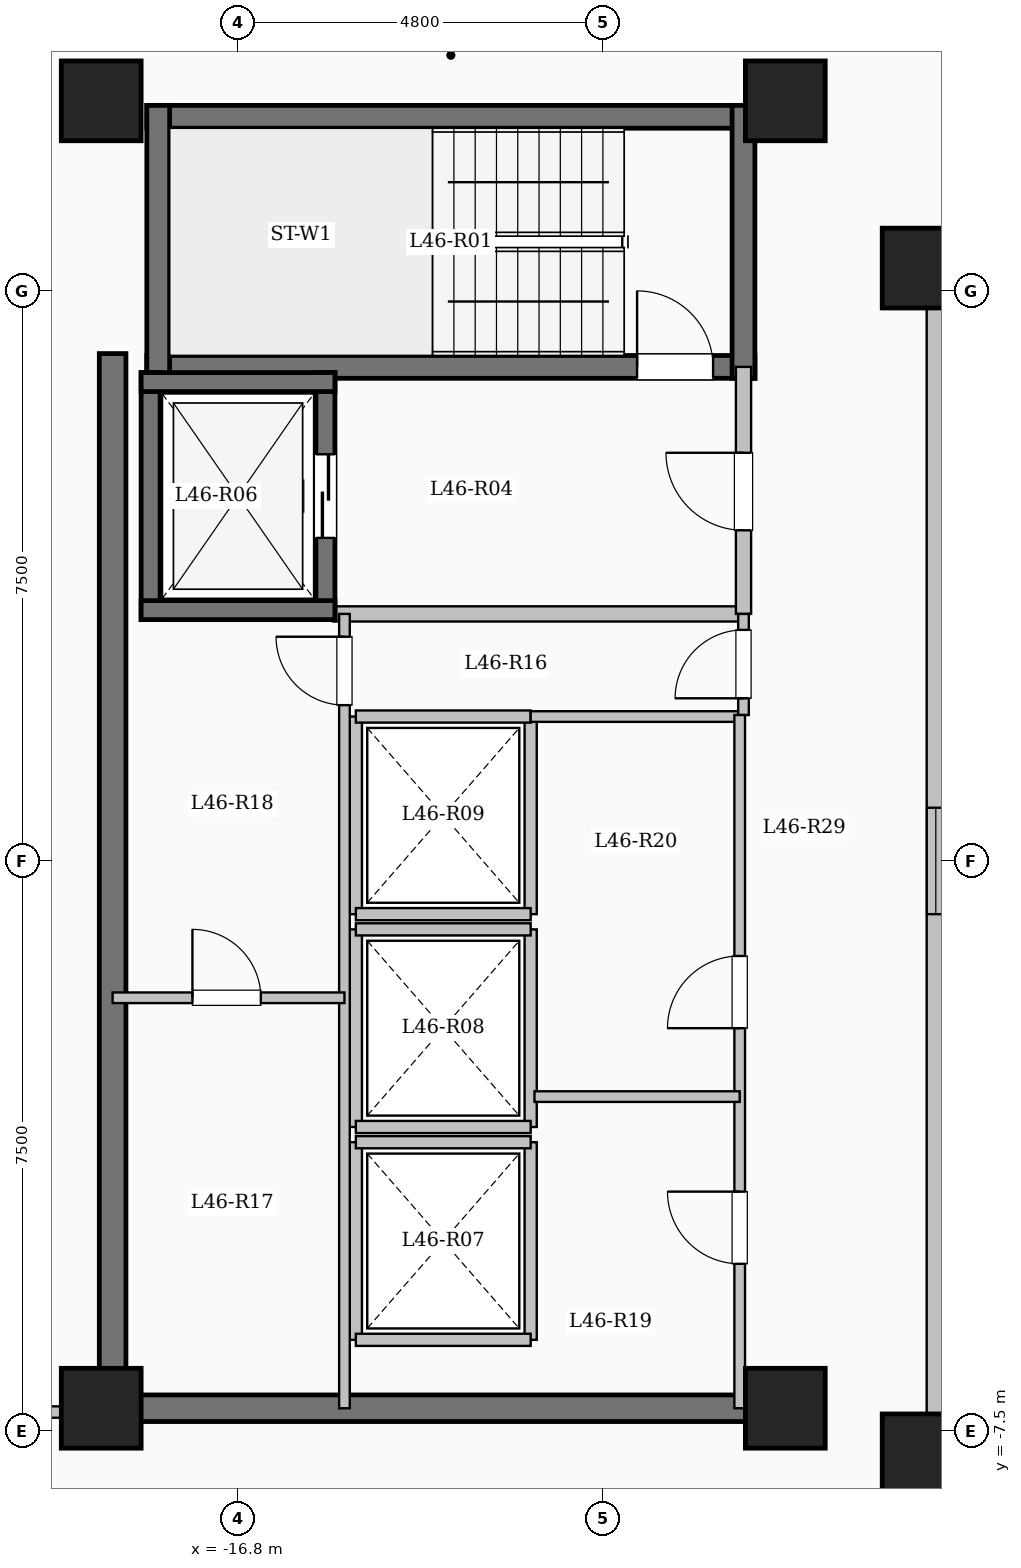
"""IFC4 building model, lengths in metres.
Left out: names, types, materials, properties, quantities, classifications, styles, units other than length and angle.
Written with IfcOpenShell. Run it as: python <this file> out.ifc"""

import sys

from ifc_helpers import new_model, si_unit, direction, frame, frame_2d, origin, origin_2d, place, context, subcontext, project, spatial, rectangle, extrude, element, fill, save


model = new_model("IFC4")
c1 = context("Model", 3, precision=1e-05, world=origin(), true_north=direction((0.0, 1.0)))
c2 = subcontext(c1, "Body", "Model", "MODEL_VIEW")
j1 = project(units=[si_unit("LENGTHUNIT", "METRE"), si_unit("PLANEANGLEUNIT", "RADIAN")], contexts=[c1])
p1 = place(None, origin())
s1 = spatial("IfcSite", under=j1, at=p1, CompositionType="ELEMENT")
p2 = place(p1, origin())
s2 = spatial("IfcBuilding", under=s1, at=p2, CompositionType="ELEMENT")
p3 = place(p2, frame((0.0, 0.0, 169.45)))
s3 = spatial("IfcBuildingStorey", under=s2, at=p3, CompositionType="ELEMENT", Elevation=169.45)
for number, where, z_axis, x_axis in (
    (1, (-7.8, -7.8, 0.0), (0.0, 0.0, 1.0), (1.0, 0.0, 0.0)),
    (2, (-7.8, 7.8, 0.0), (0.0, 0.0, 1.0), (1.0, 0.0, 0.0)),
    (3, (-9.6, -7.2, 0.0), (0.0, 0.0, 1.0), (1.0, 0.0, 0.0)),
    (4, (-9.6, 10.0, 0.0), (0.0, 0.0, 1.0), (1.0, 0.0, 0.0)),
    (5, (-18.6, -7.2, 0.0), (0.0, 0.0, 1.0), (1.0, 0.0, 0.0)),
    (6, (-18.6, 10.0, 0.0), (0.0, 0.0, 1.0), (1.0, 0.0, 0.0)),
):
    element("IfcColumn", number, at=place(p3, frame(where, z_axis=z_axis, x_axis=x_axis)), inside=s3, PredefinedType="COLUMN", context=c2, shape_type="SweptSolid", body=[
        extrude(rectangle(XDim=1.05, YDim=1.05, at=origin_2d()), origin(), (0.0, 0.0, 1.0), 3.35),
    ])
p4 = place(p3, frame((-7.62, -7.62, 0.0), z_axis=(0.0, 0.0, 1.0), x_axis=(1.0, 0.0, 0.0)))
e7 = element("IfcWall", 7, at=p4, inside=s3, PredefinedType="SOLIDWALL", context=c2, shape_type="SweptSolid", body=[
    extrude(rectangle(XDim=15.24, YDim=0.24, at=frame_2d((7.62, 0.0))), origin(), (0.0, 0.0, 1.0), 3.05),
])
p5 = place(p4, frame((6.92, 0.0, 0.95)))
e8 = element("IfcOpeningElement", 8, at=p5, cuts=e7, PredefinedType="OPENING", context=c2, shape_type="SweptSolid", body=[
    extrude(rectangle(XDim=1.4, YDim=1.5, at=frame_2d((0.7, 0.75))), frame((0.0, 0.13, 0.0), z_axis=(0.0, -1.0, 0.0), x_axis=(1.0, 0.0, 0.0)), (0.0, 0.0, 1.0), 0.26),
])
p6 = place(p3, frame((7.62, 7.62, 0.0), z_axis=(0.0, 0.0, 1.0), x_axis=(-1.0, 0.0, 0.0)))
e9 = element("IfcWall", 9, at=p6, inside=s3, PredefinedType="SOLIDWALL", context=c2, shape_type="SweptSolid", body=[
    extrude(rectangle(XDim=15.24, YDim=0.24, at=frame_2d((7.62, 0.0))), origin(), (0.0, 0.0, 1.0), 3.05),
])
p7 = place(p6, frame((6.92, 0.0, 0.95)))
e10 = element("IfcOpeningElement", 10, at=p7, cuts=e9, PredefinedType="OPENING", context=c2, shape_type="SweptSolid", body=[
    extrude(rectangle(XDim=1.4, YDim=1.5, at=frame_2d((0.7, 0.75))), frame((0.0, 0.13, 0.0), z_axis=(0.0, -1.0, 0.0), x_axis=(1.0, 0.0, 0.0)), (0.0, 0.0, 1.0), 0.26),
])
p8 = place(p3, frame((-7.62, 7.62, 0.0), z_axis=(0.0, 0.0, 1.0), x_axis=(0.0, -1.0, 0.0)))
e11 = element("IfcWall", 11, at=p8, inside=s3, PredefinedType="SOLIDWALL", context=c2, shape_type="SweptSolid", body=[
    extrude(rectangle(XDim=15.24, YDim=0.24, at=frame_2d((7.62, 0.0))), origin(), (0.0, 0.0, 1.0), 3.05),
])
p9 = place(p8, frame((6.92, 0.0, 0.95)))
e12 = element("IfcOpeningElement", 12, at=p9, cuts=e11, PredefinedType="OPENING", context=c2, shape_type="SweptSolid", body=[
    extrude(rectangle(XDim=1.4, YDim=1.5, at=frame_2d((0.7, 0.75))), frame((0.0, 0.13, 0.0), z_axis=(0.0, -1.0, 0.0), x_axis=(1.0, 0.0, 0.0)), (0.0, 0.0, 1.0), 0.26),
])
p10 = place(p3, frame((-18.0, 9.79, 0.0), z_axis=(0.0, 0.0, 1.0), x_axis=(1.0, 0.0, 0.0)))
e13 = element("IfcWall", 13, at=p10, inside=s3, PredefinedType="SHEAR", context=c2, shape_type="SweptSolid", body=[
    extrude(rectangle(XDim=8.0, YDim=0.3, at=frame_2d((4.0, 0.0))), origin(), (0.0, 0.0, 1.0), 3.35),
])
p11 = place(p3, frame((-18.0, 6.5, 0.0), z_axis=(0.0, 0.0, 1.0), x_axis=(1.0, 0.0, 0.0)))
e14 = element("IfcWall", 14, at=p11, inside=s3, PredefinedType="SHEAR", context=c2, shape_type="SweptSolid", body=[
    extrude(rectangle(XDim=8.0, YDim=0.3, at=frame_2d((4.0, 0.0))), origin(), (0.0, 0.0, 1.0), 3.35),
])
p12 = place(p11, frame((6.45, 0.0, 0.0)))
e15 = element("IfcOpeningElement", 15, at=p12, cuts=e14, PredefinedType="OPENING", context=c2, shape_type="SweptSolid", body=[
    extrude(rectangle(XDim=1.0, YDim=2.15, at=frame_2d((0.5, 1.075))), frame((0.0, 0.16, 0.0), z_axis=(0.0, -1.0, 0.0), x_axis=(1.0, 0.0, 0.0)), (0.0, 0.0, 1.0), 0.32),
])
for number, where, z_axis, x_axis in (
    (16, (-17.85, 6.35, 0.0), (0.0, 0.0, 1.0), (0.0, 1.0, 0.0)),
    (17, (-10.15, 6.35, 0.0), (0.0, 0.0, 1.0), (0.0, 1.0, 0.0)),
):
    element("IfcWall", number, at=place(p3, frame(where, z_axis=z_axis, x_axis=x_axis)), inside=s3, PredefinedType="SHEAR", context=c2, shape_type="SweptSolid", body=[
        extrude(rectangle(XDim=3.59, YDim=0.3, at=frame_2d((1.795, 0.0))), origin(), (0.0, 0.0, 1.0), 3.35),
    ])
p13 = place(p3, frame((-15.55, 3.25, 0.0), z_axis=(0.0, 0.0, 1.0), x_axis=(1.0, 0.0, 0.0)))
e18 = element("IfcWall", 18, at=p13, inside=s3, PredefinedType="SOLIDWALL", context=c2, shape_type="SweptSolid", body=[
    extrude(rectangle(XDim=5.4, YDim=0.2, at=frame_2d((2.7, 0.0))), origin(), (0.0, 0.0, 1.0), 3.05),
])
p14 = place(p3, frame((-10.15, 3.25, 0.0), z_axis=(0.0, 0.0, 1.0), x_axis=(0.0, 1.0, 0.0)))
e19 = element("IfcWall", 19, at=p14, inside=s3, PredefinedType="SOLIDWALL", context=c2, shape_type="SweptSolid", body=[
    extrude(rectangle(XDim=3.25, YDim=0.2, at=frame_2d((1.625, 0.0))), origin(), (0.0, 0.0, 1.0), 3.05),
])
p15 = place(p14, frame((1.1, 0.0, 0.0)))
e20 = element("IfcOpeningElement", 20, at=p15, cuts=e19, PredefinedType="OPENING", context=c2, shape_type="SweptSolid", body=[
    extrude(rectangle(XDim=1.02, YDim=2.15, at=frame_2d((0.51, 1.075))), frame((0.0, 0.11, 0.0), z_axis=(0.0, -1.0, 0.0), x_axis=(1.0, 0.0, 0.0)), (0.0, 0.0, 1.0), 0.22),
])
p16 = place(p3, frame((-17.95, 3.175, 0.0), z_axis=(0.0, 0.0, 1.0), x_axis=(0.0, 1.0, 0.0)))
e21 = element("IfcWall", 21, at=p16, inside=s3, PredefinedType="SHEAR", context=c2, shape_type="SweptSolid", body=[
    extrude(rectangle(XDim=3.25, YDim=0.25, at=frame_2d((1.625, 0.0))), origin(), (0.0, 0.0, 1.0), 3.35),
])
p17 = place(p3, frame((-15.65, 3.175, 0.0), z_axis=(0.0, 0.0, 1.0), x_axis=(0.0, 1.0, 0.0)))
e22 = element("IfcWall", 22, at=p17, inside=s3, PredefinedType="SHEAR", context=c2, shape_type="SweptSolid", body=[
    extrude(rectangle(XDim=3.25, YDim=0.25, at=frame_2d((1.625, 0.0))), origin(), (0.0, 0.0, 1.0), 3.35),
])
p18 = place(p17, frame((1.075, 0.0, 0.0)))
e23 = element("IfcOpeningElement", 23, at=p18, cuts=e22, PredefinedType="OPENING", context=c2, shape_type="SweptSolid", body=[
    extrude(rectangle(XDim=1.1, YDim=2.15, at=frame_2d((0.55, 1.075))), frame((0.0, 0.135, 0.0), z_axis=(0.0, -1.0, 0.0), x_axis=(1.0, 0.0, 0.0)), (0.0, 0.0, 1.0), 0.27),
])
for number, where, z_axis, x_axis in (
    (24, (-18.075, 3.3, 0.0), (0.0, 0.0, 1.0), (1.0, 0.0, 0.0)),
    (25, (-18.075, 6.3, 0.0), (0.0, 0.0, 1.0), (1.0, 0.0, 0.0)),
):
    element("IfcWall", number, at=place(p3, frame(where, z_axis=z_axis, x_axis=x_axis)), inside=s3, PredefinedType="SHEAR", context=c2, shape_type="SweptSolid", body=[
        extrude(rectangle(XDim=2.55, YDim=0.25, at=frame_2d((1.275, 0.0))), origin(), (0.0, 0.0, 1.0), 3.35),
    ])
for number, where, z_axis, x_axis in (
    (26, (-15.25, -6.3, 0.0), (0.0, 0.0, 1.0), (0.0, 1.0, 0.0)),
    (27, (-12.95, -6.3, 0.0), (0.0, 0.0, 1.0), (0.0, 1.0, 0.0)),
):
    element("IfcWall", number, at=place(p3, frame(where, z_axis=z_axis, x_axis=x_axis)), inside=s3, PredefinedType="SOLIDWALL", context=c2, shape_type="SweptSolid", body=[
        extrude(rectangle(XDim=2.6, YDim=0.16, at=frame_2d((1.3, 0.0))), origin(), (0.0, 0.0, 1.0), 3.05),
    ])
for number, where, z_axis, x_axis in (
    (28, (-15.25, -6.3, 0.0), (0.0, 0.0, 1.0), (1.0, 0.0, 0.0)),
    (29, (-15.25, -3.7, 0.0), (0.0, 0.0, 1.0), (1.0, 0.0, 0.0)),
):
    element("IfcWall", number, at=place(p3, frame(where, z_axis=z_axis, x_axis=x_axis)), inside=s3, PredefinedType="SOLIDWALL", context=c2, shape_type="SweptSolid", body=[
        extrude(rectangle(XDim=2.3, YDim=0.16, at=frame_2d((1.15, 0.0))), origin(), (0.0, 0.0, 1.0), 3.05),
    ])
for number, where, z_axis, x_axis in (
    (30, (-15.25, -3.5, 0.0), (0.0, 0.0, 1.0), (0.0, 1.0, 0.0)),
    (31, (-12.95, -3.5, 0.0), (0.0, 0.0, 1.0), (0.0, 1.0, 0.0)),
):
    element("IfcWall", number, at=place(p3, frame(where, z_axis=z_axis, x_axis=x_axis)), inside=s3, PredefinedType="SOLIDWALL", context=c2, shape_type="SweptSolid", body=[
        extrude(rectangle(XDim=2.6, YDim=0.16, at=frame_2d((1.3, 0.0))), origin(), (0.0, 0.0, 1.0), 3.05),
    ])
for number, where, z_axis, x_axis in (
    (32, (-15.25, -3.5, 0.0), (0.0, 0.0, 1.0), (1.0, 0.0, 0.0)),
    (33, (-15.25, -0.9, 0.0), (0.0, 0.0, 1.0), (1.0, 0.0, 0.0)),
):
    element("IfcWall", number, at=place(p3, frame(where, z_axis=z_axis, x_axis=x_axis)), inside=s3, PredefinedType="SOLIDWALL", context=c2, shape_type="SweptSolid", body=[
        extrude(rectangle(XDim=2.3, YDim=0.16, at=frame_2d((1.15, 0.0))), origin(), (0.0, 0.0, 1.0), 3.05),
    ])
for number, where, z_axis, x_axis in (
    (34, (-15.25, -0.7, 0.0), (0.0, 0.0, 1.0), (0.0, 1.0, 0.0)),
    (35, (-12.95, -0.7, 0.0), (0.0, 0.0, 1.0), (0.0, 1.0, 0.0)),
):
    element("IfcWall", number, at=place(p3, frame(where, z_axis=z_axis, x_axis=x_axis)), inside=s3, PredefinedType="SOLIDWALL", context=c2, shape_type="SweptSolid", body=[
        extrude(rectangle(XDim=2.6, YDim=0.16, at=frame_2d((1.3, 0.0))), origin(), (0.0, 0.0, 1.0), 3.05),
    ])
for number, where, z_axis, x_axis in (
    (36, (-15.25, -0.7, 0.0), (0.0, 0.0, 1.0), (1.0, 0.0, 0.0)),
    (37, (-15.25, 1.9, 0.0), (0.0, 0.0, 1.0), (1.0, 0.0, 0.0)),
):
    element("IfcWall", number, at=place(p3, frame(where, z_axis=z_axis, x_axis=x_axis)), inside=s3, PredefinedType="SOLIDWALL", context=c2, shape_type="SweptSolid", body=[
        extrude(rectangle(XDim=2.3, YDim=0.16, at=frame_2d((1.15, 0.0))), origin(), (0.0, 0.0, 1.0), 3.05),
    ])
p19 = place(p3, frame((-18.45, -7.375, 0.0), z_axis=(0.0, 0.0, 1.0), x_axis=(0.0, 1.0, 0.0)))
e38 = element("IfcWall", 38, at=p19, inside=s3, PredefinedType="SHEAR", context=c2, shape_type="SweptSolid", body=[
    extrude(rectangle(XDim=14.05, YDim=0.35, at=frame_2d((7.025, 0.0))), origin(), (0.0, 0.0, 1.0), 3.35),
])
p20 = place(p3, frame((-18.625, -7.2, 0.0), z_axis=(0.0, 0.0, 1.0), x_axis=(1.0, 0.0, 0.0)))
e39 = element("IfcWall", 39, at=p20, inside=s3, PredefinedType="SHEAR", context=c2, shape_type="SweptSolid", body=[
    extrude(rectangle(XDim=8.55, YDim=0.35, at=frame_2d((4.275, 0.0))), origin(), (0.0, 0.0, 1.0), 3.35),
])
p21 = place(p3, frame((-12.95, 1.9, 0.0), z_axis=(0.0, 0.0, 1.0), x_axis=(1.0, 0.0, 0.0)))
e40 = element("IfcWall", 40, at=p21, inside=s3, PredefinedType="PARTITIONING", context=c2, shape_type="SweptSolid", body=[
    extrude(rectangle(XDim=2.8, YDim=0.14, at=frame_2d((1.4, 0.0))), origin(), (0.0, 0.0, 1.0), 3.05),
])
p22 = place(p3, frame((-10.15, 1.92, 0.0), z_axis=(0.0, 0.0, 1.0), x_axis=(0.0, 1.0, 0.0)))
e41 = element("IfcWall", 41, at=p22, inside=s3, PredefinedType="PARTITIONING", context=c2, shape_type="SweptSolid", body=[
    extrude(rectangle(XDim=1.33, YDim=0.14, at=frame_2d((0.665, 0.0))), origin(), (0.0, 0.0, 1.0), 3.05),
])
p23 = place(p22, frame((0.22, 0.0, 0.0)))
e42 = element("IfcOpeningElement", 42, at=p23, cuts=e41, PredefinedType="OPENING", context=c2, shape_type="SweptSolid", body=[
    extrude(rectangle(XDim=0.9, YDim=2.08, at=frame_2d((0.45, 1.04))), frame((0.0, 0.08, 0.0), z_axis=(0.0, -1.0, 0.0), x_axis=(1.0, 0.0, 0.0)), (0.0, 0.0, 1.0), 0.16),
])
p24 = place(p3, frame((-15.4, -7.2, 0.0), z_axis=(0.0, 0.0, 1.0), x_axis=(0.0, 1.0, 0.0)))
e43 = element("IfcWall", 43, at=p24, inside=s3, PredefinedType="PARTITIONING", context=c2, shape_type="SweptSolid", body=[
    extrude(rectangle(XDim=10.45, YDim=0.14, at=frame_2d((5.225, 0.0))), origin(), (0.0, 0.0, 1.0), 3.05),
])
p25 = place(p24, frame((9.25, 0.0, 0.0)))
e44 = element("IfcOpeningElement", 44, at=p25, cuts=e43, PredefinedType="OPENING", context=c2, shape_type="SweptSolid", body=[
    extrude(rectangle(XDim=0.9, YDim=2.08, at=frame_2d((0.45, 1.04))), frame((0.0, 0.08, 0.0), z_axis=(0.0, -1.0, 0.0), x_axis=(1.0, 0.0, 0.0)), (0.0, 0.0, 1.0), 0.16),
])
p26 = place(p3, frame((-18.45, -1.8, 0.0), z_axis=(0.0, 0.0, 1.0), x_axis=(1.0, 0.0, 0.0)))
e45 = element("IfcWall", 45, at=p26, inside=s3, PredefinedType="PARTITIONING", context=c2, shape_type="SweptSolid", body=[
    extrude(rectangle(XDim=3.05, YDim=0.14, at=frame_2d((1.525, 0.0))), origin(), (0.0, 0.0, 1.0), 3.05),
])
p27 = place(p26, frame((1.05, 0.0, 0.0)))
e46 = element("IfcOpeningElement", 46, at=p27, cuts=e45, PredefinedType="OPENING", context=c2, shape_type="SweptSolid", body=[
    extrude(rectangle(XDim=0.9, YDim=2.08, at=frame_2d((0.45, 1.04))), frame((0.0, 0.08, 0.0), z_axis=(0.0, -1.0, 0.0), x_axis=(1.0, 0.0, 0.0)), (0.0, 0.0, 1.0), 0.16),
])
p28 = place(p3, frame((-10.2, -7.2, 0.0), z_axis=(0.0, 0.0, 1.0), x_axis=(0.0, 1.0, 0.0)))
e47 = element("IfcWall", 47, at=p28, inside=s3, PredefinedType="PARTITIONING", context=c2, shape_type="SweptSolid", body=[
    extrude(rectangle(XDim=9.12, YDim=0.14, at=frame_2d((4.56, 0.0))), origin(), (0.0, 0.0, 1.0), 3.05),
])
p29 = place(p28, frame((1.9, 0.0, 0.0)))
e48 = element("IfcOpeningElement", 48, at=p29, cuts=e47, PredefinedType="OPENING", context=c2, shape_type="SweptSolid", body=[
    extrude(rectangle(XDim=0.95, YDim=2.12, at=frame_2d((0.475, 1.06))), frame((0.0, 0.08, 0.0), z_axis=(0.0, -1.0, 0.0), x_axis=(1.0, 0.0, 0.0)), (0.0, 0.0, 1.0), 0.16),
])
p30 = place(p28, frame((5.0, 0.0, 0.0)))
e49 = element("IfcOpeningElement", 49, at=p30, cuts=e47, PredefinedType="OPENING", context=c2, shape_type="SweptSolid", body=[
    extrude(rectangle(XDim=0.95, YDim=2.12, at=frame_2d((0.475, 1.06))), frame((0.0, 0.08, 0.0), z_axis=(0.0, -1.0, 0.0), x_axis=(1.0, 0.0, 0.0)), (0.0, 0.0, 1.0), 0.16),
])
p31 = place(p3, frame((-12.9, -3.1, 0.0), z_axis=(0.0, 0.0, 1.0), x_axis=(1.0, 0.0, 0.0)))
e50 = element("IfcWall", 50, at=p31, inside=s3, PredefinedType="PARTITIONING", context=c2, shape_type="SweptSolid", body=[
    extrude(rectangle(XDim=2.7, YDim=0.14, at=frame_2d((1.35, 0.0))), origin(), (0.0, 0.0, 1.0), 3.05),
])
p32 = place(p3, frame((-25.08, -7.25, 0.0), z_axis=(0.0, 0.0, 1.0), x_axis=(1.0, 0.0, 0.0)))
e51 = element("IfcWall", 51, at=p32, inside=s3, PredefinedType="PARTITIONING", context=c2, shape_type="SweptSolid", body=[
    extrude(rectangle(XDim=6.63, YDim=0.15, at=frame_2d((3.315, 0.0))), origin(), (0.0, 0.0, 1.0), 3.05),
])
p33 = place(p32, frame((3.58, 0.0, 0.0)))
e52 = element("IfcOpeningElement", 52, at=p33, cuts=e51, PredefinedType="OPENING", context=c2, shape_type="SweptSolid", body=[
    extrude(rectangle(XDim=1.08, YDim=2.15, at=frame_2d((0.54, 1.075))), frame((0.0, 0.085, 0.0), z_axis=(0.0, -1.0, 0.0), x_axis=(1.0, 0.0, 0.0)), (0.0, 0.0, 1.0), 0.17),
])
p34 = place(p9, origin())
e53 = element("IfcWindow", 53, at=p34, inside=s3, PartitioningType="SINGLE_PANEL", PredefinedType="WINDOW", context=c2, shape_type="SweptSolid", body=[
    extrude(rectangle(XDim=1.4, YDim=1.5, at=frame_2d((0.7, 0.75))), frame((0.0, 0.03, 0.0), z_axis=(0.0, -1.0, 0.0), x_axis=(1.0, 0.0, 0.0)), (0.0, 0.0, 1.0), 0.06),
])
fill(e12, e53)
p35 = place(p12, origin())
e54 = element("IfcDoor", 54, at=p35, inside=s3, OperationType="SINGLE_SWING_LEFT", PredefinedType="DOOR", context=c2, shape_type="SweptSolid", body=[
    extrude(rectangle(XDim=1.0, YDim=2.15, at=frame_2d((0.5, 1.075))), frame((0.0, 0.025, 0.0), z_axis=(0.0, -1.0, 0.0), x_axis=(1.0, 0.0, 0.0)), (0.0, 0.0, 1.0), 0.05),
])
fill(e15, e54)
p36 = place(p15, origin())
e55 = element("IfcDoor", 55, at=p36, inside=s3, OperationType="SINGLE_SWING_RIGHT", PredefinedType="DOOR", context=c2, shape_type="SweptSolid", body=[
    extrude(rectangle(XDim=1.02, YDim=2.15, at=frame_2d((0.51, 1.075))), frame((0.0, 0.025, 0.0), z_axis=(0.0, -1.0, 0.0), x_axis=(1.0, 0.0, 0.0)), (0.0, 0.0, 1.0), 0.05),
])
fill(e20, e55)
p37 = place(p18, origin())
e56 = element("IfcDoor", 56, at=p37, inside=s3, OperationType="SLIDING_TO_LEFT", PredefinedType="DOOR", context=c2, shape_type="SweptSolid", body=[
    extrude(rectangle(XDim=1.1, YDim=2.15, at=frame_2d((0.55, 1.075))), frame((0.0, 0.025, 0.0), z_axis=(0.0, -1.0, 0.0), x_axis=(1.0, 0.0, 0.0)), (0.0, 0.0, 1.0), 0.05),
])
fill(e23, e56)
p38 = place(p23, origin())
e57 = element("IfcDoor", 57, at=p38, inside=s3, OperationType="SINGLE_SWING_LEFT", PredefinedType="DOOR", context=c2, shape_type="SweptSolid", body=[
    extrude(rectangle(XDim=0.9, YDim=2.08, at=frame_2d((0.45, 1.04))), frame((0.0, 0.025, 0.0), z_axis=(0.0, -1.0, 0.0), x_axis=(1.0, 0.0, 0.0)), (0.0, 0.0, 1.0), 0.05),
])
fill(e42, e57)
p39 = place(p25, origin())
e58 = element("IfcDoor", 58, at=p39, inside=s3, OperationType="SINGLE_SWING_RIGHT", PredefinedType="DOOR", context=c2, shape_type="SweptSolid", body=[
    extrude(rectangle(XDim=0.9, YDim=2.08, at=frame_2d((0.45, 1.04))), frame((0.0, 0.025, 0.0), z_axis=(0.0, -1.0, 0.0), x_axis=(1.0, 0.0, 0.0)), (0.0, 0.0, 1.0), 0.05),
])
fill(e44, e58)
p40 = place(p27, origin())
e59 = element("IfcDoor", 59, at=p40, inside=s3, OperationType="SINGLE_SWING_LEFT", PredefinedType="DOOR", context=c2, shape_type="SweptSolid", body=[
    extrude(rectangle(XDim=0.9, YDim=2.08, at=frame_2d((0.45, 1.04))), frame((0.0, 0.025, 0.0), z_axis=(0.0, -1.0, 0.0), x_axis=(1.0, 0.0, 0.0)), (0.0, 0.0, 1.0), 0.05),
])
fill(e46, e59)
p41 = place(p29, origin())
e60 = element("IfcDoor", 60, at=p41, inside=s3, OperationType="SINGLE_SWING_RIGHT", PredefinedType="DOOR", context=c2, shape_type="SweptSolid", body=[
    extrude(rectangle(XDim=0.95, YDim=2.12, at=frame_2d((0.475, 1.06))), frame((0.0, 0.025, 0.0), z_axis=(0.0, -1.0, 0.0), x_axis=(1.0, 0.0, 0.0)), (0.0, 0.0, 1.0), 0.05),
])
fill(e48, e60)
p42 = place(p30, origin())
e61 = element("IfcDoor", 61, at=p42, inside=s3, OperationType="SINGLE_SWING_LEFT", PredefinedType="DOOR", context=c2, shape_type="SweptSolid", body=[
    extrude(rectangle(XDim=0.95, YDim=2.12, at=frame_2d((0.475, 1.06))), frame((0.0, 0.025, 0.0), z_axis=(0.0, -1.0, 0.0), x_axis=(1.0, 0.0, 0.0)), (0.0, 0.0, 1.0), 0.05),
])
fill(e49, e61)
save(model, sys.argv[1])
